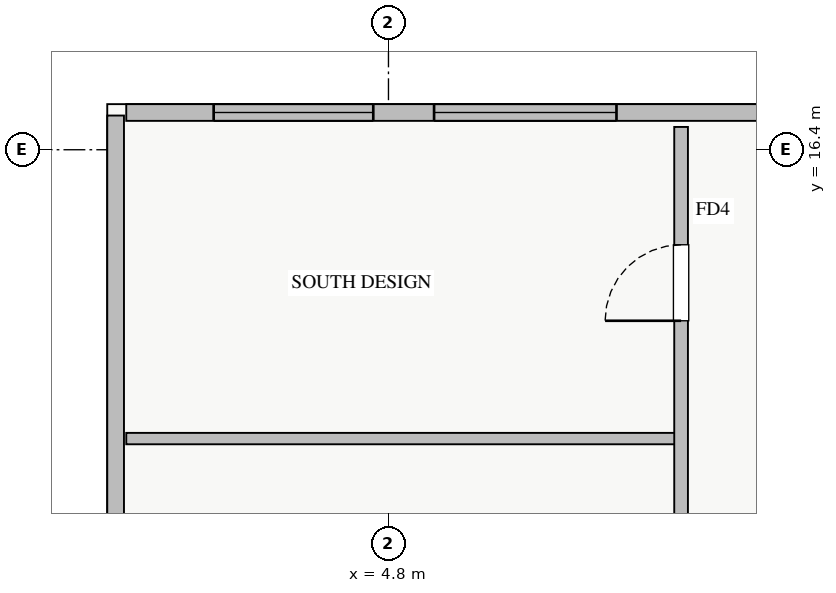
"""IFC4 building model, lengths in metres.
Left out: names, types, materials, properties, quantities, classifications, styles, units other than length and angle.
Written with IfcOpenShell. Run it as: python <this file> out.ifc"""

import sys

from ifc_helpers import new_model, si_unit, direction, frame, frame_2d, origin, place, context, subcontext, project, spatial, rectangle, extrude, source, transform, mapped, element, fill, save


model = new_model("IFC4")
c1 = context("Model", 3, precision=1e-05, world=origin(), true_north=direction((0.0, 1.0)))
c2 = subcontext(c1, "Body", "Model", "MODEL_VIEW")
j1 = project(units=[si_unit("LENGTHUNIT", "METRE"), si_unit("PLANEANGLEUNIT", "RADIAN")], contexts=[c1])
p1 = place(None, origin())
s1 = spatial("IfcSite", under=j1, at=p1, CompositionType="ELEMENT")
p2 = place(p1, origin())
s2 = spatial("IfcBuilding", under=s1, at=p2, CompositionType="ELEMENT")
p3 = place(p2, frame((0.0, 0.0, 166.5)))
s3 = spatial("IfcBuildingStorey", under=s2, at=p3, CompositionType="ELEMENT", Elevation=166.5)
p4 = place(p3, frame((1.35, 16.89, 0.0), z_axis=(0.0, 0.0, 1.0), x_axis=(1.0, 0.0, 0.0)))
e1 = element("IfcWall", 1, at=p4, inside=s3, PredefinedType="STANDARD", context=c2, shape_type="SweptSolid", body=[
    extrude(rectangle(XDim=8.87, YDim=0.22, at=frame_2d((4.435, 0.0))), origin(), (0.0, 0.0, 1.0), 2.61),
])
p5 = place(p4, frame((1.15, 0.0, 0.9)))
e2 = element("IfcOpeningElement", 2, at=p5, cuts=e1, PredefinedType="OPENING", context=c2, shape_type="SweptSolid", body=[
    extrude(rectangle(XDim=2.1, YDim=1.48, at=frame_2d((1.05, 0.74))), frame((0.0, 0.12, 0.0), z_axis=(0.0, -1.0, 0.0), x_axis=(1.0, 0.0, 0.0)), (0.0, 0.0, 1.0), 0.24),
])
p6 = place(p4, frame((4.05, 0.0, 0.9)))
e3 = element("IfcOpeningElement", 3, at=p6, cuts=e1, PredefinedType="OPENING", context=c2, shape_type="SweptSolid", body=[
    extrude(rectangle(XDim=2.4, YDim=1.5, at=frame_2d((1.2, 0.75))), frame((0.0, 0.12, 0.0), z_axis=(0.0, -1.0, 0.0), x_axis=(1.0, 0.0, 0.0)), (0.0, 0.0, 1.0), 0.24),
])
p7 = place(p3, frame((1.21, 10.55, 0.0), z_axis=(0.0, 0.0, 1.0), x_axis=(0.0, 1.0, 0.0)))
e4 = element("IfcWall", 4, at=p7, inside=s3, PredefinedType="STANDARD", context=c2, shape_type="SweptSolid", body=[
    extrude(rectangle(XDim=6.3, YDim=0.22, at=frame_2d((3.15, 0.0))), origin(), (0.0, 0.0, 1.0), 2.61),
])
p8 = place(p3, frame((1.35, 12.6, 0.0), z_axis=(0.0, 0.0, 1.0), x_axis=(1.0, 0.0, 0.0)))
e5 = element("IfcWall", 5, at=p8, inside=s3, PredefinedType="PARTITIONING", context=c2, shape_type="SweptSolid", body=[
    extrude(rectangle(XDim=7.3, YDim=0.15, at=frame_2d((3.65, 0.0))), origin(), (0.0, 0.0, 1.0), 3.07),
])
p9 = place(p3, frame((8.65, 5.35, 0.0), z_axis=(0.0, 0.0, 1.0), x_axis=(0.0, 1.0, 0.0)))
e6 = element("IfcWall", 6, at=p9, inside=s3, PredefinedType="PARTITIONING", context=c2, shape_type="SweptSolid", body=[
    extrude(rectangle(XDim=11.35, YDim=0.18, at=frame_2d((5.675, 0.0))), origin(), (0.0, 0.0, 1.0), 3.07),
])
p10 = place(p9, frame((4.6, 0.0, 0.0)))
e7 = element("IfcOpeningElement", 7, at=p10, cuts=e6, PredefinedType="OPENING", context=c2, shape_type="SweptSolid", body=[
    extrude(rectangle(XDim=1.0, YDim=2.05, at=frame_2d((0.5, 1.025))), frame((0.0, 0.1, 0.0), z_axis=(0.0, -1.0, 0.0), x_axis=(1.0, 0.0, 0.0)), (0.0, 0.0, 1.0), 0.2),
])
p11 = place(p9, frame((8.8, 0.0, 0.0)))
e8 = element("IfcOpeningElement", 8, at=p11, cuts=e6, PredefinedType="OPENING", context=c2, shape_type="SweptSolid", body=[
    extrude(rectangle(XDim=1.0, YDim=2.05, at=frame_2d((0.5, 1.025))), frame((0.0, 0.1, 0.0), z_axis=(0.0, -1.0, 0.0), x_axis=(1.0, 0.0, 0.0)), (0.0, 0.0, 1.0), 0.2),
])
m1 = source(origin(), c2, "Body", "SweptSolid", [
    extrude(rectangle(XDim=2.1, YDim=1.48, at=frame_2d((1.05, 0.74))), frame((0.0, 0.03, 0.0), z_axis=(0.0, -1.0, 0.0), x_axis=(1.0, 0.0, 0.0)), (0.0, 0.0, 1.0), 0.06),
])
p12 = place(p5, origin())
e9 = element("IfcWindow", 9, at=p12, inside=s3, PartitioningType="TRIPLE_PANEL_VERTICAL", PredefinedType="WINDOW", context=c2, shape_type="MappedRepresentation", body=[
    mapped(m1, transform((0.0, 0.0, 0.0), x_axis=(1.0, 0.0, 0.0), y_axis=(0.0, 1.0, 0.0), z_axis=(0.0, 0.0, 1.0), scale=1.0)),
])
fill(e2, e9)
m2 = source(origin(), c2, "Body", "SweptSolid", [
    extrude(rectangle(XDim=2.4, YDim=1.5, at=frame_2d((1.2, 0.75))), frame((0.0, 0.03, 0.0), z_axis=(0.0, -1.0, 0.0), x_axis=(1.0, 0.0, 0.0)), (0.0, 0.0, 1.0), 0.06),
])
p13 = place(p6, origin())
e10 = element("IfcWindow", 10, at=p13, inside=s3, PartitioningType="TRIPLE_PANEL_VERTICAL", PredefinedType="WINDOW", context=c2, shape_type="MappedRepresentation", body=[
    mapped(m2, transform((0.0, 0.0, 0.0), x_axis=(1.0, 0.0, 0.0), y_axis=(0.0, 1.0, 0.0), z_axis=(0.0, 0.0, 1.0), scale=1.0)),
])
fill(e3, e10)
m3 = source(origin(), c2, "Body", "SweptSolid", [
    extrude(rectangle(XDim=1.0, YDim=2.05, at=frame_2d((0.5, 1.025))), frame((0.0, 0.025, 0.0), z_axis=(0.0, -1.0, 0.0), x_axis=(1.0, 0.0, 0.0)), (0.0, 0.0, 1.0), 0.05),
])
p14 = place(p11, origin())
e11 = element("IfcDoor", 11, at=p14, inside=s3, OperationType="SINGLE_SWING_LEFT", PredefinedType="DOOR", context=c2, shape_type="MappedRepresentation", body=[
    mapped(m3, transform((0.0, 0.0, 0.0), x_axis=(1.0, 0.0, 0.0), y_axis=(0.0, 1.0, 0.0), z_axis=(0.0, 0.0, 1.0), scale=1.0)),
])
fill(e8, e11)
save(model, sys.argv[1])
